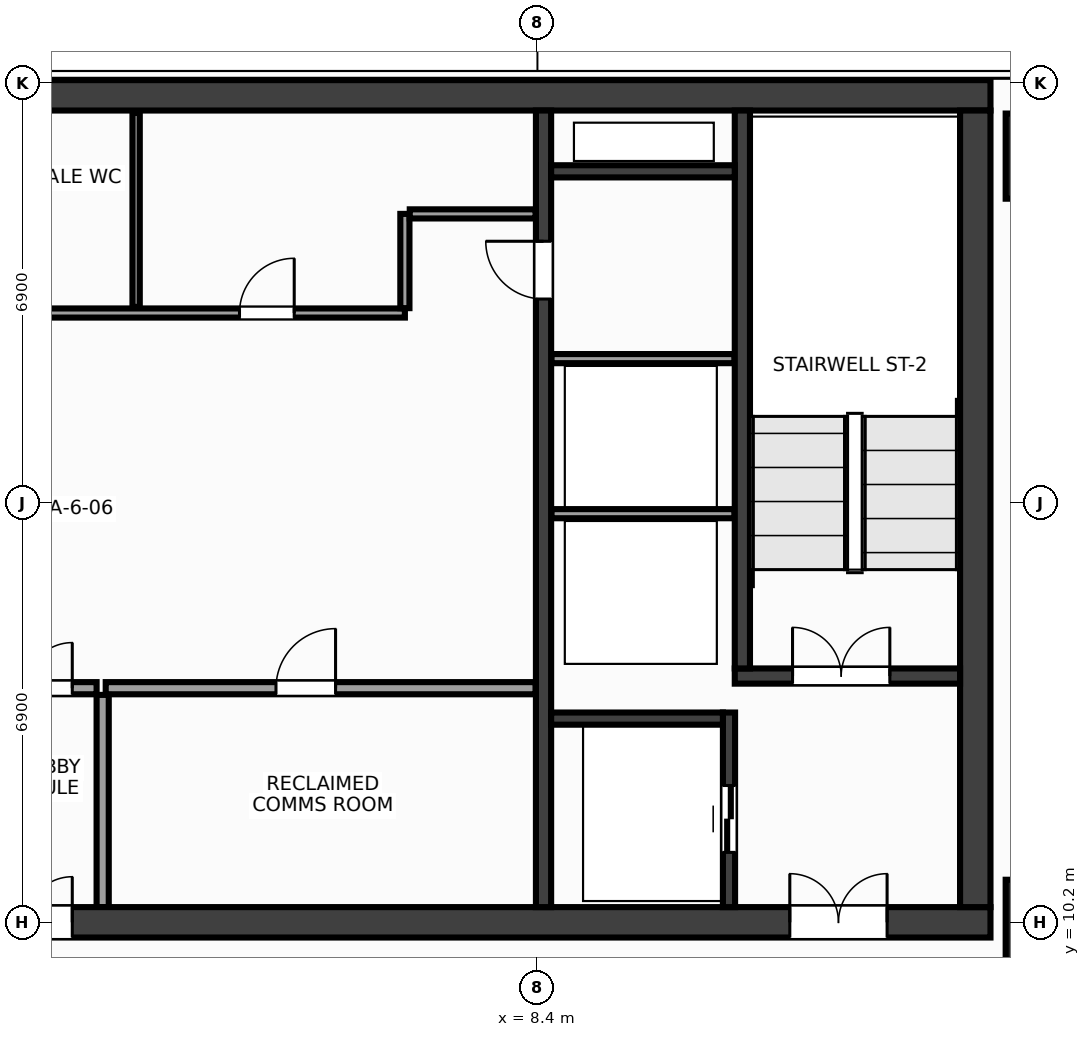
"""IFC4 building model, lengths in metres.
Left out: names, types, materials, properties, quantities, classifications, styles, units other than length and angle.
Written with IfcOpenShell. Run it as: python <this file> out.ifc"""

import sys

from ifc_helpers import new_model, si_unit, direction, frame, frame_2d, origin, origin_2d, place, context, subcontext, project, spatial, rectangle, extrude, source, transform, mapped, element, fill, save


model = new_model("IFC4")
c1 = context("Model", 3, precision=1e-05, world=origin(), true_north=direction((0.0, 1.0)))
c2 = subcontext(c1, "Body", "Model", "MODEL_VIEW")
j1 = project(units=[si_unit("LENGTHUNIT", "METRE"), si_unit("PLANEANGLEUNIT", "RADIAN")], contexts=[c1])
p1 = place(None, origin())
s1 = spatial("IfcSite", under=j1, at=p1, CompositionType="ELEMENT")
p2 = place(p1, origin())
s2 = spatial("IfcBuilding", under=s1, at=p2, CompositionType="ELEMENT")
p3 = place(p2, frame((0.0, 0.0, 232.4)))
s3 = spatial("IfcBuildingStorey", under=s2, at=p3, CompositionType="ELEMENT", Elevation=232.4)
m1 = source(origin(), c2, "Body", "SweptSolid", [
    extrude(rectangle(XDim=31.7, YDim=0.5, at=frame_2d((15.85, 0.0))), origin(), (0.0, 0.0, 1.0), 3.6),
])
p4 = place(p3, frame((-15.85, 23.8, 0.0), z_axis=(0.0, 0.0, 1.0), x_axis=(1.0, 0.0, 0.0)))
e1 = element("IfcWall", 1, at=p4, inside=s3, PredefinedType="SHEAR", context=c2, shape_type="MappedRepresentation", body=[
    mapped(m1, transform((0.0, 0.0, 0.0), x_axis=(1.0, 0.0, 0.0), y_axis=(0.0, 1.0, 0.0), z_axis=(0.0, 0.0, 1.0), scale=1.0)),
])
p5 = place(p3, frame((-15.85, 10.2, 0.0), z_axis=(0.0, 0.0, 1.0), x_axis=(1.0, 0.0, 0.0)))
e2 = element("IfcWall", 2, at=p5, inside=s3, PredefinedType="SHEAR", context=c2, shape_type="MappedRepresentation", body=[
    mapped(m1, transform((0.0, 0.0, 0.0), x_axis=(1.0, 0.0, 0.0), y_axis=(0.0, 1.0, 0.0), z_axis=(0.0, 0.0, 1.0), scale=1.0)),
])
p6 = place(p5, frame((1.7, 0.0, 0.0)))
e3 = element("IfcOpeningElement", 3, at=p6, cuts=e2, PredefinedType="OPENING", context=c2, shape_type="SweptSolid", body=[
    extrude(rectangle(XDim=1.6, YDim=2.15, at=frame_2d((0.8, 1.075))), frame((0.0, 0.262, 0.0), z_axis=(0.0, -1.0, 0.0), x_axis=(1.0, 0.0, 0.0)), (0.0, 0.0, 1.0), 0.524),
])
p7 = place(p5, frame((28.4, 0.0, 0.0)))
e4 = element("IfcOpeningElement", 4, at=p7, cuts=e2, PredefinedType="OPENING", context=c2, shape_type="SweptSolid", body=[
    extrude(rectangle(XDim=1.6, YDim=2.15, at=frame_2d((0.8, 1.075))), frame((0.0, 0.262, 0.0), z_axis=(0.0, -1.0, 0.0), x_axis=(1.0, 0.0, 0.0)), (0.0, 0.0, 1.0), 0.524),
])
p8 = place(p5, frame((15.1, 0.0, 0.0)))
e5 = element("IfcOpeningElement", 5, at=p8, cuts=e2, PredefinedType="OPENING", context=c2, shape_type="SweptSolid", body=[
    extrude(rectangle(XDim=1.5, YDim=2.2, at=frame_2d((0.75, 1.1))), frame((0.0, 0.262, 0.0), z_axis=(0.0, -1.0, 0.0), x_axis=(1.0, 0.0, 0.0)), (0.0, 0.0, 1.0), 0.524),
])
m2 = source(origin(), c2, "Body", "SweptSolid", [
    extrude(rectangle(XDim=13.1, YDim=0.5, at=frame_2d((6.55, 0.0))), origin(), (0.0, 0.0, 1.0), 3.6),
])
p9 = place(p3, frame((15.6, 10.45, 0.0), z_axis=(0.0, 0.0, 1.0), x_axis=(0.0, 1.0, 0.0)))
e6 = element("IfcWall", 6, at=p9, inside=s3, PredefinedType="SHEAR", context=c2, shape_type="MappedRepresentation", body=[
    mapped(m2, transform((0.0, 0.0, 0.0), x_axis=(1.0, 0.0, 0.0), y_axis=(0.0, 1.0, 0.0), z_axis=(0.0, 0.0, 1.0), scale=1.0)),
])
m3 = source(origin(), c2, "Body", "SweptSolid", [
    extrude(rectangle(XDim=13.1, YDim=0.25, at=frame_2d((6.55, 0.0))), origin(), (0.0, 0.0, 1.0), 3.6),
])
p10 = place(p3, frame((8.5, 10.45, 0.0), z_axis=(0.0, 0.0, 1.0), x_axis=(0.0, 1.0, 0.0)))
e7 = element("IfcWall", 7, at=p10, inside=s3, PredefinedType="SHEAR", context=c2, shape_type="MappedRepresentation", body=[
    mapped(m3, transform((0.0, 0.0, 0.0), x_axis=(1.0, 0.0, 0.0), y_axis=(0.0, 1.0, 0.0), z_axis=(0.0, 0.0, 1.0), scale=1.0)),
])
p11 = place(p10, frame((10.0, 0.0, 0.0)))
e8 = element("IfcOpeningElement", 8, at=p11, cuts=e7, PredefinedType="OPENING", context=c2, shape_type="SweptSolid", body=[
    extrude(rectangle(XDim=0.95, YDim=2.15, at=frame_2d((0.475, 1.075))), frame((0.0, 0.137, 0.0), z_axis=(0.0, -1.0, 0.0), x_axis=(1.0, 0.0, 0.0)), (0.0, 0.0, 1.0), 0.274),
])
m4 = source(origin(), c2, "Body", "SweptSolid", [
    extrude(rectangle(XDim=3.705, YDim=0.25, at=frame_2d((1.853, 0.0))), origin(), (0.0, 0.0, 1.0), 3.6),
])
p12 = place(p3, frame((11.645, 14.25, 0.0), z_axis=(0.0, 0.0, 1.0), x_axis=(1.0, 0.0, 0.0)))
e9 = element("IfcWall", 9, at=p12, inside=s3, PredefinedType="SHEAR", context=c2, shape_type="MappedRepresentation", body=[
    mapped(m4, transform((0.0, 0.0, 0.0), x_axis=(1.0, 0.0, 0.0), y_axis=(0.0, 1.0, 0.0), z_axis=(0.0, 0.0, 1.0), scale=1.0)),
])
p13 = place(p12, frame((0.95, 0.0, 0.0)))
e10 = element("IfcOpeningElement", 10, at=p13, cuts=e9, PredefinedType="OPENING", context=c2, shape_type="SweptSolid", body=[
    extrude(rectangle(XDim=1.6, YDim=2.15, at=frame_2d((0.8, 1.075))), frame((0.0, 0.137, 0.0), z_axis=(0.0, -1.0, 0.0), x_axis=(1.0, 0.0, 0.0)), (0.0, 0.0, 1.0), 0.274),
])
m5 = source(origin(), c2, "Body", "SweptSolid", [
    extrude(rectangle(XDim=9.175, YDim=0.25, at=frame_2d((4.587, 0.0))), origin(), (0.0, 0.0, 1.0), 3.6),
])
p14 = place(p3, frame((11.77, 14.375, 0.0), z_axis=(0.0, 0.0, 1.0), x_axis=(0.0, 1.0, 0.0)))
e11 = element("IfcWall", 11, at=p14, inside=s3, PredefinedType="SHEAR", context=c2, shape_type="MappedRepresentation", body=[
    mapped(m5, transform((0.0, 0.0, 0.0), x_axis=(1.0, 0.0, 0.0), y_axis=(0.0, 1.0, 0.0), z_axis=(0.0, 0.0, 1.0), scale=1.0)),
])
m6 = source(origin(), c2, "Body", "SweptSolid", [
    extrude(rectangle(XDim=3.2, YDim=0.2, at=frame_2d((1.6, 0.0))), origin(), (0.0, 0.0, 1.0), 3.6),
])
p15 = place(p3, frame((11.55, 10.45, 0.0), z_axis=(0.0, 0.0, 1.0), x_axis=(0.0, 1.0, 0.0)))
e12 = element("IfcWall", 12, at=p15, inside=s3, PredefinedType="SHEAR", context=c2, shape_type="MappedRepresentation", body=[
    mapped(m6, transform((0.0, 0.0, 0.0), x_axis=(1.0, 0.0, 0.0), y_axis=(0.0, 1.0, 0.0), z_axis=(0.0, 0.0, 1.0), scale=1.0)),
])
p16 = place(p15, frame((0.9, 0.0, 0.0)))
e13 = element("IfcOpeningElement", 13, at=p16, cuts=e12, PredefinedType="OPENING", context=c2, shape_type="SweptSolid", body=[
    extrude(rectangle(XDim=1.1, YDim=2.15, at=frame_2d((0.55, 1.075))), frame((0.0, 0.112, 0.0), z_axis=(0.0, -1.0, 0.0), x_axis=(1.0, 0.0, 0.0)), (0.0, 0.0, 1.0), 0.224),
])
m7 = source(origin(), c2, "Body", "SweptSolid", [
    extrude(rectangle(XDim=2.825, YDim=0.2, at=frame_2d((1.413, 0.0))), origin(), (0.0, 0.0, 1.0), 3.6),
])
p17 = place(p3, frame((8.625, 13.55, 0.0), z_axis=(0.0, 0.0, 1.0), x_axis=(1.0, 0.0, 0.0)))
e14 = element("IfcWall", 14, at=p17, inside=s3, PredefinedType="SHEAR", context=c2, shape_type="MappedRepresentation", body=[
    mapped(m7, transform((0.0, 0.0, 0.0), x_axis=(1.0, 0.0, 0.0), y_axis=(0.0, 1.0, 0.0), z_axis=(0.0, 0.0, 1.0), scale=1.0)),
])
m8 = source(origin(), c2, "Body", "SweptSolid", [
    extrude(rectangle(XDim=3.02, YDim=0.2, at=frame_2d((1.51, 0.0))), origin(), (0.0, 0.0, 1.0), 3.6),
])
p18 = place(p3, frame((8.625, 22.55, 0.0), z_axis=(0.0, 0.0, 1.0), x_axis=(1.0, 0.0, 0.0)))
e15 = element("IfcWall", 15, at=p18, inside=s3, PredefinedType="SHEAR", context=c2, shape_type="MappedRepresentation", body=[
    mapped(m8, transform((0.0, 0.0, 0.0), x_axis=(1.0, 0.0, 0.0), y_axis=(0.0, 1.0, 0.0), z_axis=(0.0, 0.0, 1.0), scale=1.0)),
])
m9 = source(origin(), c2, "Body", "SweptSolid", [
    extrude(rectangle(XDim=1.4, YDim=1.4, at=origin_2d()), origin(), (0.0, 0.0, 1.0), 3.6),
])
for number, where, z_axis, x_axis in (
    (16, (16.8, 10.2, 0.0), (0.0, 0.0, 1.0), (1.0, 0.0, 0.0)),
    (17, (16.8, 22.8, 0.0), (0.0, 0.0, 1.0), (1.0, 0.0, 0.0)),
):
    element("IfcColumn", number, at=place(p3, frame(where, z_axis=z_axis, x_axis=x_axis)), inside=s3, PredefinedType="COLUMN", context=c2, shape_type="MappedRepresentation", body=[
        mapped(m9, transform((0.0, 0.0, 0.0), x_axis=(1.0, 0.0, 0.0), y_axis=(0.0, 1.0, 0.0), z_axis=(0.0, 0.0, 1.0), scale=1.0)),
    ])
m10 = source(origin(), c2, "Body", "SweptSolid", [
    extrude(rectangle(XDim=3.01, YDim=0.15, at=frame_2d((1.505, 0.0))), origin(), (0.0, 0.0, 1.0), 3.37),
])
for number, where, z_axis, x_axis in (
    (18, (8.63, 16.92, 0.0), (0.0, 0.0, 1.0), (1.0, 0.0, 0.0)),
    (19, (8.63, 19.47, 0.0), (0.0, 0.0, 1.0), (1.0, 0.0, 0.0)),
):
    element("IfcWall", number, at=place(p3, frame(where, z_axis=z_axis, x_axis=x_axis)), inside=s3, PredefinedType="PARTITIONING", context=c2, shape_type="MappedRepresentation", body=[
        mapped(m10, transform((0.0, 0.0, 0.0), x_axis=(1.0, 0.0, 0.0), y_axis=(0.0, 1.0, 0.0), z_axis=(0.0, 0.0, 1.0), scale=1.0)),
    ])
m11 = source(origin(), c2, "Body", "SweptSolid", [
    extrude(rectangle(XDim=7.07, YDim=0.2, at=frame_2d((3.535, 0.0))), origin(), (0.0, 0.0, 1.0), 3.37),
])
p19 = place(p3, frame((1.3, 14.05, 0.0), z_axis=(0.0, 0.0, 1.0), x_axis=(1.0, 0.0, 0.0)))
e20 = element("IfcWall", 20, at=p19, inside=s3, PredefinedType="PARTITIONING", context=c2, shape_type="MappedRepresentation", body=[
    mapped(m11, transform((0.0, 0.0, 0.0), x_axis=(1.0, 0.0, 0.0), y_axis=(0.0, 1.0, 0.0), z_axis=(0.0, 0.0, 1.0), scale=1.0)),
])
p20 = place(p19, frame((2.8, 0.0, 0.0)))
e21 = element("IfcOpeningElement", 21, at=p20, cuts=e20, PredefinedType="OPENING", context=c2, shape_type="SweptSolid", body=[
    extrude(rectangle(XDim=0.98, YDim=2.15, at=frame_2d((0.49, 1.075))), frame((0.0, 0.112, 0.0), z_axis=(0.0, -1.0, 0.0), x_axis=(1.0, 0.0, 0.0)), (0.0, 0.0, 1.0), 0.224),
])
m12 = source(origin(), c2, "Body", "SweptSolid", [
    extrude(rectangle(XDim=3.49, YDim=0.2, at=frame_2d((1.745, 0.0))), origin(), (0.0, 0.0, 1.0), 3.37),
])
p21 = place(p3, frame((1.25, 10.45, 0.0), z_axis=(0.0, 0.0, 1.0), x_axis=(0.0, 1.0, 0.0)))
e22 = element("IfcWall", 22, at=p21, inside=s3, PredefinedType="PARTITIONING", context=c2, shape_type="MappedRepresentation", body=[
    mapped(m12, transform((0.0, 0.0, 0.0), x_axis=(1.0, 0.0, 0.0), y_axis=(0.0, 1.0, 0.0), z_axis=(0.0, 0.0, 1.0), scale=1.0)),
])
m13 = source(origin(), c2, "Body", "SweptSolid", [
    extrude(rectangle(XDim=2.3, YDim=0.2, at=frame_2d((1.15, 0.0))), origin(), (0.0, 0.0, 1.0), 3.37),
])
p22 = place(p3, frame((-1.15, 14.05, 0.0), z_axis=(0.0, 0.0, 1.0), x_axis=(1.0, 0.0, 0.0)))
e23 = element("IfcWall", 23, at=p22, inside=s3, PredefinedType="PARTITIONING", context=c2, shape_type="MappedRepresentation", body=[
    mapped(m13, transform((0.0, 0.0, 0.0), x_axis=(1.0, 0.0, 0.0), y_axis=(0.0, 1.0, 0.0), z_axis=(0.0, 0.0, 1.0), scale=1.0)),
])
p23 = place(p22, frame((0.4, 0.0, 0.0)))
e24 = element("IfcOpeningElement", 24, at=p23, cuts=e23, PredefinedType="OPENING", context=c2, shape_type="SweptSolid", body=[
    extrude(rectangle(XDim=1.5, YDim=2.2, at=frame_2d((0.75, 1.1))), frame((0.0, 0.112, 0.0), z_axis=(0.0, -1.0, 0.0), x_axis=(1.0, 0.0, 0.0)), (0.0, 0.0, 1.0), 0.224),
])
m14 = source(origin(), c2, "Body", "SweptSolid", [
    extrude(rectangle(XDim=14.59, YDim=0.15, at=frame_2d((7.295, 0.0))), origin(), (0.0, 0.0, 1.0), 3.37),
])
p24 = place(p3, frame((-8.37, 20.22, 0.0), z_axis=(0.0, 0.0, 1.0), x_axis=(1.0, 0.0, 0.0)))
e25 = element("IfcWall", 25, at=p24, inside=s3, PredefinedType="PARTITIONING", context=c2, shape_type="MappedRepresentation", body=[
    mapped(m14, transform((0.0, 0.0, 0.0), x_axis=(1.0, 0.0, 0.0), y_axis=(0.0, 1.0, 0.0), z_axis=(0.0, 0.0, 1.0), scale=1.0)),
])
p25 = place(p24, frame((1.06, 0.0, 0.0)))
e26 = element("IfcOpeningElement", 26, at=p25, cuts=e25, PredefinedType="OPENING", context=c2, shape_type="SweptSolid", body=[
    extrude(rectangle(XDim=0.9, YDim=2.15, at=frame_2d((0.45, 1.075))), frame((0.0, 0.087, 0.0), z_axis=(0.0, -1.0, 0.0), x_axis=(1.0, 0.0, 0.0)), (0.0, 0.0, 1.0), 0.174),
])
p26 = place(p24, frame((4.22, 0.0, 0.0)))
e27 = element("IfcOpeningElement", 27, at=p26, cuts=e25, PredefinedType="OPENING", context=c2, shape_type="SweptSolid", body=[
    extrude(rectangle(XDim=0.9, YDim=2.15, at=frame_2d((0.45, 1.075))), frame((0.0, 0.087, 0.0), z_axis=(0.0, -1.0, 0.0), x_axis=(1.0, 0.0, 0.0)), (0.0, 0.0, 1.0), 0.174),
])
p27 = place(p24, frame((7.82, 0.0, 0.0)))
e28 = element("IfcOpeningElement", 28, at=p27, cuts=e25, PredefinedType="OPENING", context=c2, shape_type="SweptSolid", body=[
    extrude(rectangle(XDim=0.9, YDim=2.15, at=frame_2d((0.45, 1.075))), frame((0.0, 0.087, 0.0), z_axis=(0.0, -1.0, 0.0), x_axis=(1.0, 0.0, 0.0)), (0.0, 0.0, 1.0), 0.174),
])
p28 = place(p24, frame((11.87, 0.0, 0.0)))
e29 = element("IfcOpeningElement", 29, at=p28, cuts=e25, PredefinedType="OPENING", context=c2, shape_type="SweptSolid", body=[
    extrude(rectangle(XDim=0.9, YDim=2.15, at=frame_2d((0.45, 1.075))), frame((0.0, 0.087, 0.0), z_axis=(0.0, -1.0, 0.0), x_axis=(1.0, 0.0, 0.0)), (0.0, 0.0, 1.0), 0.174),
])
m15 = source(origin(), c2, "Body", "SweptSolid", [
    extrude(rectangle(XDim=1.55, YDim=0.15, at=frame_2d((0.775, 0.0))), origin(), (0.0, 0.0, 1.0), 3.37),
])
p29 = place(p3, frame((6.22, 20.3, 0.0), z_axis=(0.0, 0.0, 1.0), x_axis=(0.0, 1.0, 0.0)))
e30 = element("IfcWall", 30, at=p29, inside=s3, PredefinedType="PARTITIONING", context=c2, shape_type="MappedRepresentation", body=[
    mapped(m15, transform((0.0, 0.0, 0.0), x_axis=(1.0, 0.0, 0.0), y_axis=(0.0, 1.0, 0.0), z_axis=(0.0, 0.0, 1.0), scale=1.0)),
])
m16 = source(origin(), c2, "Body", "SweptSolid", [
    extrude(rectangle(XDim=2.07, YDim=0.15, at=frame_2d((1.035, 0.0))), origin(), (0.0, 0.0, 1.0), 3.37),
])
p30 = place(p3, frame((6.3, 21.85, 0.0), z_axis=(0.0, 0.0, 1.0), x_axis=(1.0, 0.0, 0.0)))
e31 = element("IfcWall", 31, at=p30, inside=s3, PredefinedType="PARTITIONING", context=c2, shape_type="MappedRepresentation", body=[
    mapped(m16, transform((0.0, 0.0, 0.0), x_axis=(1.0, 0.0, 0.0), y_axis=(0.0, 1.0, 0.0), z_axis=(0.0, 0.0, 1.0), scale=1.0)),
])
m17 = source(origin(), c2, "Body", "SweptSolid", [
    extrude(rectangle(XDim=3.19, YDim=0.12, at=frame_2d((1.595, 0.0))), origin(), (0.0, 0.0, 1.0), 3.37),
])
p31 = place(p3, frame((1.8, 20.32, 0.0), z_axis=(0.0, 0.0, 1.0), x_axis=(0.0, 1.0, 0.0)))
e32 = element("IfcWall", 32, at=p31, inside=s3, PredefinedType="PARTITIONING", context=c2, shape_type="MappedRepresentation", body=[
    mapped(m17, transform((0.0, 0.0, 0.0), x_axis=(1.0, 0.0, 0.0), y_axis=(0.0, 1.0, 0.0), z_axis=(0.0, 0.0, 1.0), scale=1.0)),
])
m18 = source(origin(), c2, "Body", "SweptSolid", [
    extrude(rectangle(XDim=1.6, YDim=2.15, at=frame_2d((0.8, 1.075))), frame((0.0, 0.025, 0.0), z_axis=(0.0, -1.0, 0.0), x_axis=(1.0, 0.0, 0.0)), (0.0, 0.0, 1.0), 0.05),
])
p32 = place(p13, origin())
e33 = element("IfcDoor", 33, at=p32, inside=s3, OperationType="DOUBLE_DOOR_SINGLE_SWING", PredefinedType="DOOR", context=c2, shape_type="MappedRepresentation", body=[
    mapped(m18, transform((0.0, 0.0, 0.0), x_axis=(1.0, 0.0, 0.0), y_axis=(0.0, 1.0, 0.0), z_axis=(0.0, 0.0, 1.0), scale=1.0)),
])
fill(e10, e33)
p33 = place(p7, origin())
e34 = element("IfcDoor", 34, at=p33, inside=s3, OperationType="DOUBLE_DOOR_SINGLE_SWING", PredefinedType="DOOR", context=c2, shape_type="MappedRepresentation", body=[
    mapped(m18, transform((0.0, 0.0, 0.0), x_axis=(1.0, 0.0, 0.0), y_axis=(0.0, 1.0, 0.0), z_axis=(0.0, 0.0, 1.0), scale=1.0)),
])
fill(e4, e34)
m19 = source(origin(), c2, "Body", "SweptSolid", [
    extrude(rectangle(XDim=1.1, YDim=2.15, at=frame_2d((0.55, 1.075))), frame((0.0, 0.025, 0.0), z_axis=(0.0, -1.0, 0.0), x_axis=(1.0, 0.0, 0.0)), (0.0, 0.0, 1.0), 0.05),
])
p34 = place(p16, origin())
e35 = element("IfcDoor", 35, at=p34, inside=s3, OperationType="DOUBLE_DOOR_SLIDING", PredefinedType="DOOR", context=c2, shape_type="MappedRepresentation", body=[
    mapped(m19, transform((0.0, 0.0, 0.0), x_axis=(1.0, 0.0, 0.0), y_axis=(0.0, 1.0, 0.0), z_axis=(0.0, 0.0, 1.0), scale=1.0)),
])
fill(e13, e35)
m20 = source(origin(), c2, "Body", "SweptSolid", [
    extrude(rectangle(XDim=0.95, YDim=2.15, at=frame_2d((0.475, 1.075))), frame((0.0, 0.025, 0.0), z_axis=(0.0, -1.0, 0.0), x_axis=(1.0, 0.0, 0.0)), (0.0, 0.0, 1.0), 0.05),
])
p35 = place(p11, origin())
e36 = element("IfcDoor", 36, at=p35, inside=s3, OperationType="SINGLE_SWING_RIGHT", PredefinedType="DOOR", context=c2, shape_type="MappedRepresentation", body=[
    mapped(m20, transform((0.0, 0.0, 0.0), x_axis=(1.0, 0.0, 0.0), y_axis=(0.0, 1.0, 0.0), z_axis=(0.0, 0.0, 1.0), scale=1.0)),
])
fill(e8, e36)
m21 = source(origin(), c2, "Body", "SweptSolid", [
    extrude(rectangle(XDim=0.98, YDim=2.15, at=frame_2d((0.49, 1.075))), frame((0.0, 0.025, 0.0), z_axis=(0.0, -1.0, 0.0), x_axis=(1.0, 0.0, 0.0)), (0.0, 0.0, 1.0), 0.05),
])
p36 = place(p20, origin())
e37 = element("IfcDoor", 37, at=p36, inside=s3, OperationType="SINGLE_SWING_RIGHT", PredefinedType="DOOR", context=c2, shape_type="MappedRepresentation", body=[
    mapped(m21, transform((0.0, 0.0, 0.0), x_axis=(1.0, 0.0, 0.0), y_axis=(0.0, 1.0, 0.0), z_axis=(0.0, 0.0, 1.0), scale=1.0)),
])
fill(e21, e37)
m22 = source(origin(), c2, "Body", "SweptSolid", [
    extrude(rectangle(XDim=1.5, YDim=2.2, at=frame_2d((0.75, 1.1))), frame((0.0, 0.025, 0.0), z_axis=(0.0, -1.0, 0.0), x_axis=(1.0, 0.0, 0.0)), (0.0, 0.0, 1.0), 0.05),
])
p37 = place(p23, origin())
e38 = element("IfcDoor", 38, at=p37, inside=s3, OperationType="DOUBLE_DOOR_SINGLE_SWING", PredefinedType="DOOR", context=c2, shape_type="MappedRepresentation", body=[
    mapped(m22, transform((0.0, 0.0, 0.0), x_axis=(1.0, 0.0, 0.0), y_axis=(0.0, 1.0, 0.0), z_axis=(0.0, 0.0, 1.0), scale=1.0)),
])
fill(e24, e38)
p38 = place(p8, origin())
e39 = element("IfcDoor", 39, at=p38, inside=s3, OperationType="DOUBLE_DOOR_SINGLE_SWING", PredefinedType="DOOR", context=c2, shape_type="MappedRepresentation", body=[
    mapped(m22, transform((0.0, 0.0, 0.0), x_axis=(1.0, 0.0, 0.0), y_axis=(0.0, 1.0, 0.0), z_axis=(0.0, 0.0, 1.0), scale=1.0)),
])
fill(e5, e39)
m23 = source(origin(), c2, "Body", "SweptSolid", [
    extrude(rectangle(XDim=0.9, YDim=2.15, at=frame_2d((0.45, 1.075))), frame((0.0, 0.025, 0.0), z_axis=(0.0, -1.0, 0.0), x_axis=(1.0, 0.0, 0.0)), (0.0, 0.0, 1.0), 0.05),
])
p39 = place(p28, origin())
e40 = element("IfcDoor", 40, at=p39, inside=s3, OperationType="SINGLE_SWING_RIGHT", PredefinedType="DOOR", context=c2, shape_type="MappedRepresentation", body=[
    mapped(m23, transform((0.0, 0.0, 0.0), x_axis=(1.0, 0.0, 0.0), y_axis=(0.0, 1.0, 0.0), z_axis=(0.0, 0.0, 1.0), scale=1.0)),
])
fill(e29, e40)
save(model, sys.argv[1])
